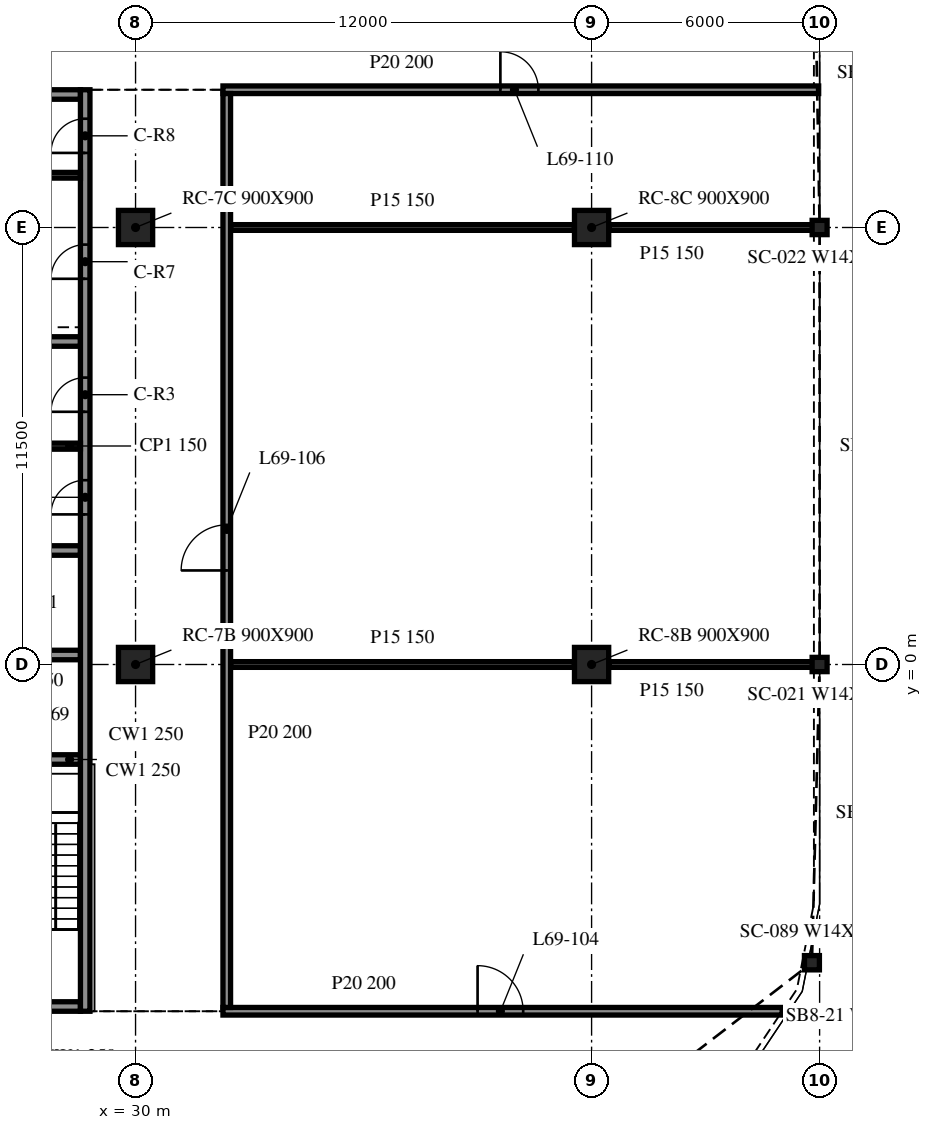
"""IFC4 building model, lengths in metres.
Left out: names, types, materials, properties, quantities, classifications, styles, units other than length and angle.
Written with IfcOpenShell. Run it as: python <this file> out.ifc"""

import sys

from ifc_helpers import new_model, si_unit, direction, frame, frame_2d, origin, origin_2d, place, context, subcontext, project, spatial, rectangle, i_section, extrude, element, fill, save


model = new_model("IFC4")
c1 = context("Model", 3, precision=1e-05, world=origin(), true_north=direction((0.0, 1.0)))
c2 = subcontext(c1, "Body", "Model", "MODEL_VIEW")
j1 = project(units=[si_unit("LENGTHUNIT", "METRE"), si_unit("PLANEANGLEUNIT", "RADIAN")], contexts=[c1])
p1 = place(None, origin())
s1 = spatial("IfcSite", under=j1, at=p1, CompositionType="ELEMENT")
p2 = place(p1, origin())
s2 = spatial("IfcBuilding", under=s1, at=p2, CompositionType="ELEMENT")
p3 = place(p2, frame((0.0, 0.0, 282.3)))
s3 = spatial("IfcBuildingStorey", under=s2, at=p3, CompositionType="ELEMENT", Elevation=282.3)
for number, where, z_axis, x_axis in (
    (1, (30.0, 0.0, -0.34), (0.0, 0.0, 1.0), (1.0, 0.0, 0.0)),
    (2, (30.0, 11.5, -0.34), (0.0, 0.0, 1.0), (1.0, 0.0, 0.0)),
    (3, (42.0, 0.0, -0.34), (0.0, 0.0, 1.0), (1.0, 0.0, 0.0)),
    (4, (42.0, 11.5, -0.34), (0.0, 0.0, 1.0), (1.0, 0.0, 0.0)),
):
    element("IfcColumn", number, at=place(p3, frame(where, z_axis=z_axis, x_axis=x_axis)), inside=s3, PredefinedType="COLUMN", context=c2, shape_type="SweptSolid", body=[
        extrude(rectangle(XDim=0.9, YDim=0.9, at=origin_2d()), origin(), (0.0, 0.0, 1.0), 7.34),
    ])
for number, where, z_axis, x_axis in (
    (5, (47.798, -7.848, -0.34), (0.0, 0.0, 1.0), (1.0, 0.0, 0.0)),
    (6, (48.0, 0.0, -0.34), (0.0, 0.0, 1.0), (1.0, 0.0, 0.0)),
    (7, (48.0, 11.5, -0.34), (0.0, 0.0, 1.0), (1.0, 0.0, 0.0)),
):
    element("IfcColumn", number, at=place(p3, frame(where, z_axis=z_axis, x_axis=x_axis)), inside=s3, PredefinedType="COLUMN", context=c2, shape_type="SweptSolid", body=[
        extrude(i_section(OverallWidth=0.394, OverallDepth=0.376, WebThickness=0.017, FlangeThickness=0.028, at=origin_2d()), origin(), (0.0, 0.0, 1.0), 3.8),
    ])
p4 = place(p3, frame((28.675, -9.125, 0.0), z_axis=(0.0, 0.0, 1.0), x_axis=(0.0, 1.0, 0.0)))
e8 = element("IfcWall", 8, at=p4, inside=s3, PredefinedType="SOLIDWALL", context=c2, shape_type="SweptSolid", body=[
    extrude(rectangle(XDim=24.25, YDim=0.25, at=frame_2d((12.125, 0.0))), origin(), (0.0, 0.0, 1.0), 3.46),
])
p5 = place(p4, frame((13.075, 0.0, 0.0)))
e9 = element("IfcOpeningElement", 9, at=p5, cuts=e8, PredefinedType="OPENING", context=c2, shape_type="SweptSolid", body=[
    extrude(rectangle(XDim=0.9, YDim=2.1, at=frame_2d((0.45, 1.05))), frame((0.0, 0.135, 0.0), z_axis=(0.0, -1.0, 0.0), x_axis=(1.0, 0.0, 0.0)), (0.0, 0.0, 1.0), 0.27),
])
p6 = place(p4, frame((15.775, 0.0, 0.0)))
e10 = element("IfcOpeningElement", 10, at=p6, cuts=e8, PredefinedType="OPENING", context=c2, shape_type="SweptSolid", body=[
    extrude(rectangle(XDim=0.9, YDim=2.1, at=frame_2d((0.45, 1.05))), frame((0.0, 0.135, 0.0), z_axis=(0.0, -1.0, 0.0), x_axis=(1.0, 0.0, 0.0)), (0.0, 0.0, 1.0), 0.27),
])
p7 = place(p4, frame((19.275, 0.0, 0.0)))
e11 = element("IfcOpeningElement", 11, at=p7, cuts=e8, PredefinedType="OPENING", context=c2, shape_type="SweptSolid", body=[
    extrude(rectangle(XDim=0.9, YDim=2.1, at=frame_2d((0.45, 1.05))), frame((0.0, 0.135, 0.0), z_axis=(0.0, -1.0, 0.0), x_axis=(1.0, 0.0, 0.0)), (0.0, 0.0, 1.0), 0.27),
])
p8 = place(p4, frame((22.587, 0.0, 0.0)))
e12 = element("IfcOpeningElement", 12, at=p8, cuts=e8, PredefinedType="OPENING", context=c2, shape_type="SweptSolid", body=[
    extrude(rectangle(XDim=0.9, YDim=2.1, at=frame_2d((0.45, 1.05))), frame((0.0, 0.135, 0.0), z_axis=(0.0, -1.0, 0.0), x_axis=(1.0, 0.0, 0.0)), (0.0, 0.0, 1.0), 0.27),
])
p9 = place(p3, frame((28.55, -9.0, 0.0), z_axis=(0.0, 0.0, 1.0), x_axis=(-1.0, 0.0, 0.0)))
e13 = element("IfcWall", 13, at=p9, inside=s3, PredefinedType="SOLIDWALL", context=c2, shape_type="SweptSolid", body=[
    extrude(rectangle(XDim=9.1, YDim=0.25, at=frame_2d((4.55, 0.0))), origin(), (0.0, 0.0, 1.0), 3.46),
])
p10 = place(p9, frame((3.65, 0.0, 0.0)))
e14 = element("IfcOpeningElement", 14, at=p10, cuts=e13, PredefinedType="OPENING", context=c2, shape_type="SweptSolid", body=[
    extrude(rectangle(XDim=1.8, YDim=2.1, at=frame_2d((0.9, 1.05))), frame((0.0, 0.135, 0.0), z_axis=(0.0, -1.0, 0.0), x_axis=(1.0, 0.0, 0.0)), (0.0, 0.0, 1.0), 0.27),
])
p11 = place(p3, frame((19.45, 15.0, 0.0), z_axis=(0.0, 0.0, 1.0), x_axis=(1.0, 0.0, 0.0)))
e15 = element("IfcWall", 15, at=p11, inside=s3, PredefinedType="SOLIDWALL", context=c2, shape_type="SweptSolid", body=[
    extrude(rectangle(XDim=9.1, YDim=0.25, at=frame_2d((4.55, 0.0))), origin(), (0.0, 0.0, 1.0), 3.46),
])
p12 = place(p11, frame((3.65, 0.0, 0.0)))
e16 = element("IfcOpeningElement", 16, at=p12, cuts=e15, PredefinedType="OPENING", context=c2, shape_type="SweptSolid", body=[
    extrude(rectangle(XDim=1.8, YDim=2.1, at=frame_2d((0.9, 1.05))), frame((0.0, 0.135, 0.0), z_axis=(0.0, -1.0, 0.0), x_axis=(1.0, 0.0, 0.0)), (0.0, 0.0, 1.0), 0.27),
])
for number, where, z_axis, x_axis in (
    (17, (25.7, -2.5, 0.0), (0.0, 0.0, 1.0), (1.0, 0.0, 0.0)),
    (18, (25.7, 0.25, 0.0), (0.0, 0.0, 1.0), (1.0, 0.0, 0.0)),
    (19, (25.7, 3.0, 0.0), (0.0, 0.0, 1.0), (1.0, 0.0, 0.0)),
    (20, (25.7, 8.5, 0.0), (0.0, 0.0, 1.0), (1.0, 0.0, 0.0)),
):
    element("IfcWall", number, at=place(p3, frame(where, z_axis=z_axis, x_axis=x_axis)), inside=s3, PredefinedType="SOLIDWALL", context=c2, shape_type="SweptSolid", body=[
        extrude(rectangle(XDim=2.85, YDim=0.25, at=frame_2d((1.425, 0.0))), origin(), (0.0, 0.0, 1.0), 3.46),
    ])
for number, where, z_axis, x_axis in (
    (21, (25.7, 5.75, 0.0), (0.0, 0.0, 1.0), (1.0, 0.0, 0.0)),
    (22, (25.7, 12.875, 0.0), (0.0, 0.0, 1.0), (1.0, 0.0, 0.0)),
):
    element("IfcWall", number, at=place(p3, frame(where, z_axis=z_axis, x_axis=x_axis)), inside=s3, PredefinedType="PARTITIONING", context=c2, shape_type="SweptSolid", body=[
        extrude(rectangle(XDim=2.85, YDim=0.15, at=frame_2d((1.425, 0.0))), origin(), (0.0, 0.0, 1.0), 3.46),
    ])
p13 = place(p3, frame((32.3, -9.125, 0.0), z_axis=(0.0, 0.0, 1.0), x_axis=(1.0, 0.0, 0.0)))
e23 = element("IfcWall", 23, at=p13, inside=s3, PredefinedType="PARTITIONING", context=c2, shape_type="SweptSolid", body=[
    extrude(rectangle(XDim=14.714, YDim=0.2, at=frame_2d((7.357, 0.0))), origin(), (0.0, 0.0, 1.0), 3.4),
])
p14 = place(p13, frame((6.7, 0.0, 0.0)))
e24 = element("IfcOpeningElement", 24, at=p14, cuts=e23, PredefinedType="OPENING", context=c2, shape_type="SweptSolid", body=[
    extrude(rectangle(XDim=1.2, YDim=2.1, at=frame_2d((0.6, 1.05))), frame((0.0, 0.11, 0.0), z_axis=(0.0, -1.0, 0.0), x_axis=(1.0, 0.0, 0.0)), (0.0, 0.0, 1.0), 0.22),
])
p15 = place(p3, frame((32.5, 0.0, 0.0), z_axis=(0.0, 0.0, 1.0), x_axis=(1.0, 0.0, 0.0)))
e25 = element("IfcWall", 25, at=p15, inside=s3, PredefinedType="PARTITIONING", context=c2, shape_type="SweptSolid", body=[
    extrude(rectangle(XDim=9.05, YDim=0.15, at=frame_2d((4.525, 0.0))), origin(), (0.0, 0.0, 1.0), 3.4),
])
p16 = place(p3, frame((42.45, 0.0, 0.0), z_axis=(0.0, 0.0, 1.0), x_axis=(1.0, 0.0, 0.0)))
e26 = element("IfcWall", 26, at=p16, inside=s3, PredefinedType="PARTITIONING", context=c2, shape_type="SweptSolid", body=[
    extrude(rectangle(XDim=5.525, YDim=0.15, at=frame_2d((2.763, 0.0))), origin(), (0.0, 0.0, 1.0), 3.4),
])
p17 = place(p3, frame((32.5, 11.5, 0.0), z_axis=(0.0, 0.0, 1.0), x_axis=(1.0, 0.0, 0.0)))
e27 = element("IfcWall", 27, at=p17, inside=s3, PredefinedType="PARTITIONING", context=c2, shape_type="SweptSolid", body=[
    extrude(rectangle(XDim=9.05, YDim=0.15, at=frame_2d((4.525, 0.0))), origin(), (0.0, 0.0, 1.0), 3.4),
])
p18 = place(p3, frame((42.45, 11.5, 0.0), z_axis=(0.0, 0.0, 1.0), x_axis=(1.0, 0.0, 0.0)))
e28 = element("IfcWall", 28, at=p18, inside=s3, PredefinedType="PARTITIONING", context=c2, shape_type="SweptSolid", body=[
    extrude(rectangle(XDim=5.525, YDim=0.15, at=frame_2d((2.763, 0.0))), origin(), (0.0, 0.0, 1.0), 3.4),
])
p19 = place(p3, frame((32.3, 15.125, 0.0), z_axis=(0.0, 0.0, 1.0), x_axis=(1.0, 0.0, 0.0)))
e29 = element("IfcWall", 29, at=p19, inside=s3, PredefinedType="PARTITIONING", context=c2, shape_type="SweptSolid", body=[
    extrude(rectangle(XDim=15.675, YDim=0.2, at=frame_2d((7.837, 0.0))), origin(), (0.0, 0.0, 1.0), 3.4),
])
p20 = place(p19, frame((7.3, 0.0, 0.0)))
e30 = element("IfcOpeningElement", 30, at=p20, cuts=e29, PredefinedType="OPENING", context=c2, shape_type="SweptSolid", body=[
    extrude(rectangle(XDim=1.0, YDim=2.1, at=frame_2d((0.5, 1.05))), frame((0.0, 0.11, 0.0), z_axis=(0.0, -1.0, 0.0), x_axis=(1.0, 0.0, 0.0)), (0.0, 0.0, 1.0), 0.22),
])
p21 = place(p3, frame((32.4, -9.025, 0.0), z_axis=(0.0, 0.0, 1.0), x_axis=(0.0, 1.0, 0.0)))
e31 = element("IfcWall", 31, at=p21, inside=s3, PredefinedType="PARTITIONING", context=c2, shape_type="SweptSolid", body=[
    extrude(rectangle(XDim=24.05, YDim=0.2, at=frame_2d((12.025, 0.0))), origin(), (0.0, 0.0, 1.0), 3.4),
])
p22 = place(p21, frame((11.5, 0.0, 0.0)))
e32 = element("IfcOpeningElement", 32, at=p22, cuts=e31, PredefinedType="OPENING", context=c2, shape_type="SweptSolid", body=[
    extrude(rectangle(XDim=1.2, YDim=2.1, at=frame_2d((0.6, 1.05))), frame((0.0, 0.11, 0.0), z_axis=(0.0, -1.0, 0.0), x_axis=(1.0, 0.0, 0.0)), (0.0, 0.0, 1.0), 0.22),
])
p23 = place(p5, origin())
e33 = element("IfcDoor", 33, at=p23, inside=s3, OperationType="SINGLE_SWING_RIGHT", PredefinedType="DOOR", context=c2, shape_type="SweptSolid", body=[
    extrude(rectangle(XDim=0.9, YDim=2.1, at=frame_2d((0.45, 1.05))), frame((0.0, 0.025, 0.0), z_axis=(0.0, -1.0, 0.0), x_axis=(1.0, 0.0, 0.0)), (0.0, 0.0, 1.0), 0.05),
])
fill(e9, e33)
p24 = place(p6, origin())
e34 = element("IfcDoor", 34, at=p24, inside=s3, OperationType="SINGLE_SWING_LEFT", PredefinedType="DOOR", context=c2, shape_type="SweptSolid", body=[
    extrude(rectangle(XDim=0.9, YDim=2.1, at=frame_2d((0.45, 1.05))), frame((0.0, 0.025, 0.0), z_axis=(0.0, -1.0, 0.0), x_axis=(1.0, 0.0, 0.0)), (0.0, 0.0, 1.0), 0.05),
])
fill(e10, e34)
p25 = place(p7, origin())
e35 = element("IfcDoor", 35, at=p25, inside=s3, OperationType="SINGLE_SWING_LEFT", PredefinedType="DOOR", context=c2, shape_type="SweptSolid", body=[
    extrude(rectangle(XDim=0.9, YDim=2.1, at=frame_2d((0.45, 1.05))), frame((0.0, 0.025, 0.0), z_axis=(0.0, -1.0, 0.0), x_axis=(1.0, 0.0, 0.0)), (0.0, 0.0, 1.0), 0.05),
])
fill(e11, e35)
p26 = place(p8, origin())
e36 = element("IfcDoor", 36, at=p26, inside=s3, OperationType="SINGLE_SWING_RIGHT", PredefinedType="DOOR", context=c2, shape_type="SweptSolid", body=[
    extrude(rectangle(XDim=0.9, YDim=2.1, at=frame_2d((0.45, 1.05))), frame((0.0, 0.025, 0.0), z_axis=(0.0, -1.0, 0.0), x_axis=(1.0, 0.0, 0.0)), (0.0, 0.0, 1.0), 0.05),
])
fill(e12, e36)
p27 = place(p14, origin())
e37 = element("IfcDoor", 37, at=p27, inside=s3, OperationType="SINGLE_SWING_LEFT", PredefinedType="DOOR", context=c2, shape_type="SweptSolid", body=[
    extrude(rectangle(XDim=1.2, YDim=2.1, at=frame_2d((0.6, 1.05))), frame((0.0, 0.025, 0.0), z_axis=(0.0, -1.0, 0.0), x_axis=(1.0, 0.0, 0.0)), (0.0, 0.0, 1.0), 0.05),
])
fill(e24, e37)
p28 = place(p22, origin())
e38 = element("IfcDoor", 38, at=p28, inside=s3, OperationType="SINGLE_SWING_LEFT", PredefinedType="DOOR", context=c2, shape_type="SweptSolid", body=[
    extrude(rectangle(XDim=1.2, YDim=2.1, at=frame_2d((0.6, 1.05))), frame((0.0, 0.025, 0.0), z_axis=(0.0, -1.0, 0.0), x_axis=(1.0, 0.0, 0.0)), (0.0, 0.0, 1.0), 0.05),
])
fill(e32, e38)
p29 = place(p20, origin())
e39 = element("IfcDoor", 39, at=p29, inside=s3, OperationType="SINGLE_SWING_LEFT", PredefinedType="DOOR", context=c2, shape_type="SweptSolid", body=[
    extrude(rectangle(XDim=1.0, YDim=2.1, at=frame_2d((0.5, 1.05))), frame((0.0, 0.025, 0.0), z_axis=(0.0, -1.0, 0.0), x_axis=(1.0, 0.0, 0.0)), (0.0, 0.0, 1.0), 0.05),
])
fill(e30, e39)
save(model, sys.argv[1])
